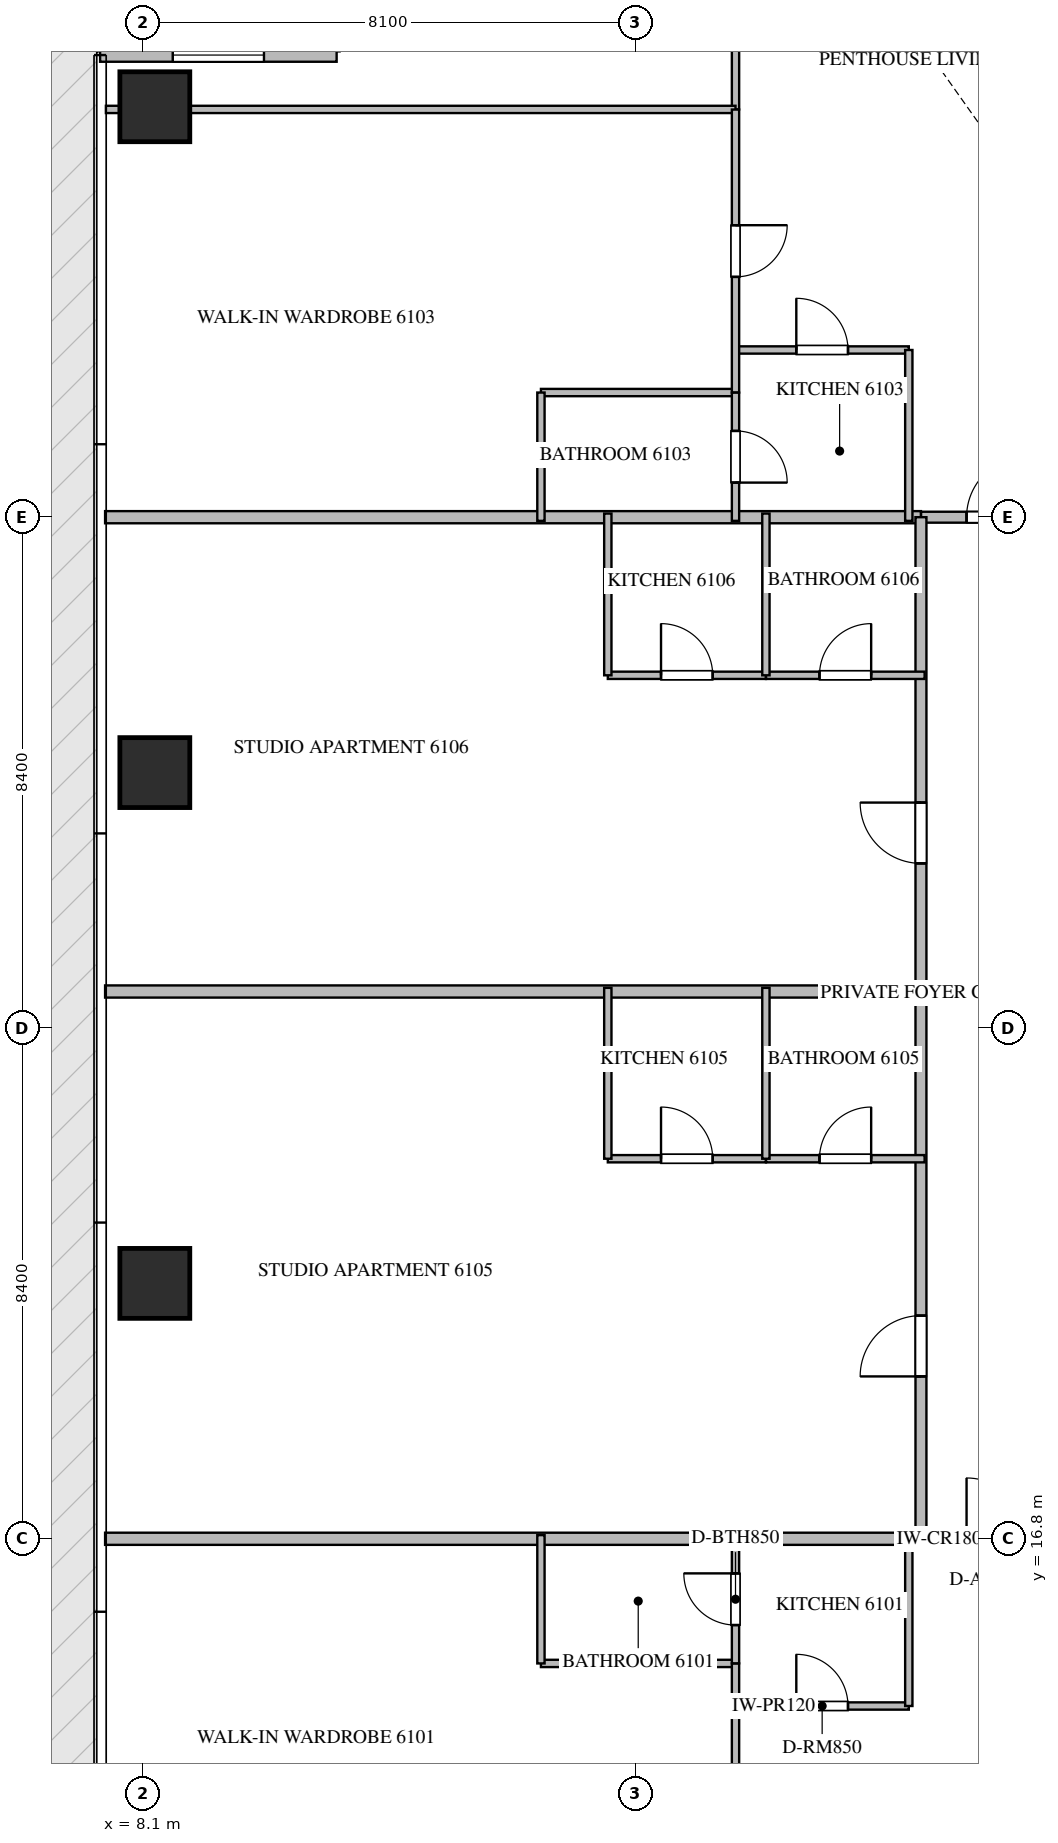
"""IFC4 building model, lengths in metres.
Left out: names, types, materials, properties, quantities, classifications, styles, units other than length and angle.
Written with IfcOpenShell. Run it as: python <this file> out.ifc"""

import sys

from ifc_helpers import new_model, si_unit, direction, frame, frame_2d, origin, origin_2d, place, context, subcontext, project, spatial, rectangle, extrude, source, transform, mapped, element, fill, save


model = new_model("IFC4")
c1 = context("Model", 3, precision=1e-05, world=origin(), true_north=direction((0.0, 1.0)))
c2 = subcontext(c1, "Body", "Model", "MODEL_VIEW")
j1 = project(units=[si_unit("LENGTHUNIT", "METRE"), si_unit("PLANEANGLEUNIT", "RADIAN")], contexts=[c1])
p1 = place(None, origin())
s1 = spatial("IfcSite", under=j1, at=p1, CompositionType="ELEMENT")
p2 = place(p1, origin())
s2 = spatial("IfcBuilding", under=s1, at=p2, CompositionType="ELEMENT")
p3 = place(p2, frame((0.0, 0.0, 245.1)))
s3 = spatial("IfcBuildingStorey", under=s2, at=p3, CompositionType="ELEMENT", Elevation=245.1)
m1 = source(origin(), c2, "Body", "SweptSolid", [
    extrude(rectangle(XDim=1.15, YDim=1.15, at=origin_2d()), origin(), (0.0, 0.0, 1.0), 3.85),
])
for number, where, z_axis, x_axis in (
    (1, (8.3, 21.0, -0.26), (0.0, 0.0, 1.0), (1.0, 0.0, 0.0)),
    (2, (8.3, 29.4, -0.26), (0.0, 0.0, 1.0), (1.0, 0.0, 0.0)),
    (3, (8.3, 40.35, -0.26), (0.0, 0.0, 1.0), (1.0, 0.0, 0.0)),
):
    element("IfcColumn", number, at=place(p3, frame(where, z_axis=z_axis, x_axis=x_axis)), inside=s3, PredefinedType="COLUMN", context=c2, shape_type="MappedRepresentation", body=[
        mapped(m1, transform((0.0, 0.0, 0.0), scale=1.0)),
    ])
p4 = place(p3, frame((11.29, 41.2, 0.0), z_axis=(0.0, 0.0, 1.0), x_axis=(-1.0, 0.0, 0.0)))
e4 = element("IfcWall", 4, at=p4, inside=s3, PredefinedType="ELEMENTEDWALL", context=c2, shape_type="SweptSolid", body=[
    extrude(rectangle(XDim=3.89, YDim=0.22, at=frame_2d((1.945, 0.0))), origin(), (0.0, 0.0, 1.0), 3.575),
])
p5 = place(p4, frame((1.195, 0.0, 0.65)))
e5 = element("IfcOpeningElement", 5, at=p5, cuts=e4, PredefinedType="OPENING", context=c2, shape_type="SweptSolid", body=[
    extrude(rectangle(XDim=1.5, YDim=2.25, at=frame_2d((0.75, 1.125))), frame((0.0, 0.12, 0.0), z_axis=(0.0, -1.0, 0.0), x_axis=(1.0, 0.0, 0.0)), (0.0, 0.0, 1.0), 0.24),
])
p6 = place(p3, frame((7.482, 25.8, 0.0), z_axis=(0.0, 0.0, 1.0), x_axis=(1.0, 0.0, 0.0)))
e6 = element("IfcWall", 6, at=p6, inside=s3, PredefinedType="PARTITIONING", context=c2, shape_type="SweptSolid", body=[
    extrude(rectangle(XDim=13.538, YDim=0.2, at=frame_2d((6.769, 0.0))), origin(), (0.0, 0.0, 1.0), 3.59),
])
for number, where, z_axis, x_axis in (
    (7, (7.482, 16.8, 0.0), (0.0, 0.0, 1.0), (1.0, 0.0, 0.0)),
    (8, (7.482, 33.6, 0.0), (0.0, 0.0, 1.0), (1.0, 0.0, 0.0)),
):
    element("IfcWall", number, at=place(p3, frame(where, z_axis=z_axis, x_axis=x_axis)), inside=s3, PredefinedType="PARTITIONING", context=c2, shape_type="SweptSolid", body=[
        extrude(rectangle(XDim=13.418, YDim=0.2, at=frame_2d((6.709, 0.0))), origin(), (0.0, 0.0, 1.0), 3.59),
    ])
p7 = place(p3, frame((20.902, 16.8, 0.0), z_axis=(0.0, 0.0, 1.0), x_axis=(1.0, 0.0, 0.0)))
e9 = element("IfcWall", 9, at=p7, inside=s3, PredefinedType="PARTITIONING", context=c2, shape_type="SweptSolid", body=[
    extrude(rectangle(XDim=2.496, YDim=0.18, at=frame_2d((1.248, 0.0))), origin(), (0.0, 0.0, 1.0), 3.59),
])
p8 = place(p7, frame((0.748, 0.0, 0.0)))
e10 = element("IfcOpeningElement", 10, at=p8, cuts=e9, PredefinedType="OPENING", context=c2, shape_type="SweptSolid", body=[
    extrude(rectangle(XDim=1.0, YDim=2.15, at=frame_2d((0.5, 1.075))), frame((0.0, 0.1, 0.0), z_axis=(0.0, -1.0, 0.0), x_axis=(1.0, 0.0, 0.0)), (0.0, 0.0, 1.0), 0.2),
])
p9 = place(p3, frame((20.902, 33.6, 0.0), z_axis=(0.0, 0.0, 1.0), x_axis=(1.0, 0.0, 0.0)))
e11 = element("IfcWall", 11, at=p9, inside=s3, PredefinedType="PARTITIONING", context=c2, shape_type="SweptSolid", body=[
    extrude(rectangle(XDim=2.496, YDim=0.18, at=frame_2d((1.248, 0.0))), origin(), (0.0, 0.0, 1.0), 3.59),
])
p10 = place(p9, frame((0.748, 0.0, 0.0)))
e12 = element("IfcOpeningElement", 12, at=p10, cuts=e11, PredefinedType="OPENING", context=c2, shape_type="SweptSolid", body=[
    extrude(rectangle(XDim=1.0, YDim=2.15, at=frame_2d((0.5, 1.075))), frame((0.0, 0.1, 0.0), z_axis=(0.0, -1.0, 0.0), x_axis=(1.0, 0.0, 0.0)), (0.0, 0.0, 1.0), 0.2),
])
p11 = place(p3, frame((20.9, 16.8, 0.0), z_axis=(0.0, 0.0, 1.0), x_axis=(0.0, 1.0, 0.0)))
e13 = element("IfcWall", 13, at=p11, inside=s3, PredefinedType="PARTITIONING", context=c2, shape_type="SweptSolid", body=[
    extrude(rectangle(XDim=16.8, YDim=0.18, at=frame_2d((8.4, 0.0))), origin(), (0.0, 0.0, 1.0), 3.59),
])
p12 = place(p11, frame((2.67, 0.0, 0.0)))
e14 = element("IfcOpeningElement", 14, at=p12, cuts=e13, PredefinedType="OPENING", context=c2, shape_type="SweptSolid", body=[
    extrude(rectangle(XDim=1.0, YDim=2.15, at=frame_2d((0.5, 1.075))), frame((0.0, 0.1, 0.0), z_axis=(0.0, -1.0, 0.0), x_axis=(1.0, 0.0, 0.0)), (0.0, 0.0, 1.0), 0.2),
])
p13 = place(p11, frame((11.107, 0.0, 0.0)))
e15 = element("IfcOpeningElement", 15, at=p13, cuts=e13, PredefinedType="OPENING", context=c2, shape_type="SweptSolid", body=[
    extrude(rectangle(XDim=1.0, YDim=2.15, at=frame_2d((0.5, 1.075))), frame((0.0, 0.1, 0.0), z_axis=(0.0, -1.0, 0.0), x_axis=(1.0, 0.0, 0.0)), (0.0, 0.0, 1.0), 0.2),
])
p14 = place(p3, frame((17.85, 14.05, 0.0), z_axis=(0.0, 0.0, 1.0), x_axis=(1.0, 0.0, 0.0)))
e16 = element("IfcWall", 16, at=p14, inside=s3, PredefinedType="PARTITIONING", context=c2, shape_type="SweptSolid", body=[
    extrude(rectangle(XDim=2.85, YDim=0.12, at=frame_2d((1.425, 0.0))), origin(), (0.0, 0.0, 1.0), 3.59),
])
p15 = place(p14, frame((1.0, 0.0, 0.0)))
e17 = element("IfcOpeningElement", 17, at=p15, cuts=e16, PredefinedType="OPENING", context=c2, shape_type="SweptSolid", body=[
    extrude(rectangle(XDim=0.85, YDim=2.1, at=frame_2d((0.425, 1.05))), frame((0.0, 0.07, 0.0), z_axis=(0.0, -1.0, 0.0), x_axis=(1.0, 0.0, 0.0)), (0.0, 0.0, 1.0), 0.14),
])
p16 = place(p3, frame((20.7, 14.05, 0.0), z_axis=(0.0, 0.0, 1.0), x_axis=(0.0, 1.0, 0.0)))
e18 = element("IfcWall", 18, at=p16, inside=s3, PredefinedType="PARTITIONING", context=c2, shape_type="SweptSolid", body=[
    extrude(rectangle(XDim=2.81, YDim=0.12, at=frame_2d((1.405, 0.0))), origin(), (0.0, 0.0, 1.0), 3.59),
])
p17 = place(p3, frame((14.65, 14.75, 0.0), z_axis=(0.0, 0.0, 1.0), x_axis=(1.0, 0.0, 0.0)))
e19 = element("IfcWall", 19, at=p17, inside=s3, PredefinedType="PARTITIONING", context=c2, shape_type="SweptSolid", body=[
    extrude(rectangle(XDim=3.2, YDim=0.12, at=frame_2d((1.6, 0.0))), origin(), (0.0, 0.0, 1.0), 3.59),
])
p18 = place(p3, frame((14.65, 14.75, 0.0), z_axis=(0.0, 0.0, 1.0), x_axis=(0.0, 1.0, 0.0)))
e20 = element("IfcWall", 20, at=p18, inside=s3, PredefinedType="PARTITIONING", context=c2, shape_type="SweptSolid", body=[
    extrude(rectangle(XDim=2.11, YDim=0.12, at=frame_2d((1.055, 0.0))), origin(), (0.0, 0.0, 1.0), 3.59),
])
p19 = place(p3, frame((17.85, 10.096, 0.0), z_axis=(0.0, 0.0, 1.0), x_axis=(0.0, 1.0, 0.0)))
e21 = element("IfcWall", 21, at=p19, inside=s3, PredefinedType="PARTITIONING", context=c2, shape_type="SweptSolid", body=[
    extrude(rectangle(XDim=4.654, YDim=0.12, at=frame_2d((2.327, 0.0))), origin(), (0.0, 0.0, 1.0), 3.59),
])
p20 = place(p19, frame((1.902, 0.0, 0.0)))
e22 = element("IfcOpeningElement", 22, at=p20, cuts=e21, PredefinedType="OPENING", context=c2, shape_type="SweptSolid", body=[
    extrude(rectangle(XDim=0.85, YDim=2.1, at=frame_2d((0.425, 1.05))), frame((0.0, 0.07, 0.0), z_axis=(0.0, -1.0, 0.0), x_axis=(1.0, 0.0, 0.0)), (0.0, 0.0, 1.0), 0.14),
])
p21 = place(p3, frame((17.85, 14.752, 0.0), z_axis=(0.0, 0.0, 1.0), x_axis=(0.0, 1.0, 0.0)))
e23 = element("IfcWall", 23, at=p21, inside=s3, PredefinedType="PARTITIONING", context=c2, shape_type="SweptSolid", body=[
    extrude(rectangle(XDim=2.108, YDim=0.12, at=frame_2d((1.054, 0.0))), origin(), (0.0, 0.0, 1.0), 3.59),
])
p22 = place(p21, frame((0.629, 0.0, 0.0)))
e24 = element("IfcOpeningElement", 24, at=p22, cuts=e23, PredefinedType="OPENING", context=c2, shape_type="SweptSolid", body=[
    extrude(rectangle(XDim=0.85, YDim=2.1, at=frame_2d((0.425, 1.05))), frame((0.0, 0.07, 0.0), z_axis=(0.0, -1.0, 0.0), x_axis=(1.0, 0.0, 0.0)), (0.0, 0.0, 1.0), 0.14),
])
p23 = place(p3, frame((17.85, 36.35, 0.0), z_axis=(0.0, 0.0, 1.0), x_axis=(1.0, 0.0, 0.0)))
e25 = element("IfcWall", 25, at=p23, inside=s3, PredefinedType="PARTITIONING", context=c2, shape_type="SweptSolid", body=[
    extrude(rectangle(XDim=2.85, YDim=0.12, at=frame_2d((1.425, 0.0))), origin(), (0.0, 0.0, 1.0), 3.59),
])
p24 = place(p23, frame((1.0, 0.0, 0.0)))
e26 = element("IfcOpeningElement", 26, at=p24, cuts=e25, PredefinedType="OPENING", context=c2, shape_type="SweptSolid", body=[
    extrude(rectangle(XDim=0.85, YDim=2.1, at=frame_2d((0.425, 1.05))), frame((0.0, 0.07, 0.0), z_axis=(0.0, -1.0, 0.0), x_axis=(1.0, 0.0, 0.0)), (0.0, 0.0, 1.0), 0.14),
])
p25 = place(p3, frame((20.7, 36.35, 0.0), z_axis=(0.0, 0.0, 1.0), x_axis=(0.0, -1.0, 0.0)))
e27 = element("IfcWall", 27, at=p25, inside=s3, PredefinedType="PARTITIONING", context=c2, shape_type="SweptSolid", body=[
    extrude(rectangle(XDim=2.81, YDim=0.12, at=frame_2d((1.405, 0.0))), origin(), (0.0, 0.0, 1.0), 3.59),
])
p26 = place(p3, frame((17.85, 49.105, 0.0), z_axis=(0.0, 0.0, 1.0), x_axis=(0.0, -1.0, 0.0)))
e28 = element("IfcWall", 28, at=p26, inside=s3, PredefinedType="PARTITIONING", context=c2, shape_type="SweptSolid", body=[
    extrude(rectangle(XDim=8.799, YDim=0.12, at=frame_2d((4.399, 0.0))), origin(), (0.0, 0.0, 1.0), 3.59),
])
p27 = place(p26, frame((4.344, 0.0, 0.0)))
e29 = element("IfcOpeningElement", 29, at=p27, cuts=e28, PredefinedType="OPENING", context=c2, shape_type="SweptSolid", body=[
    extrude(rectangle(XDim=0.9, YDim=2.1, at=frame_2d((0.45, 1.05))), frame((0.0, 0.07, 0.0), z_axis=(0.0, -1.0, 0.0), x_axis=(1.0, 0.0, 0.0)), (0.0, 0.0, 1.0), 0.14),
])
p28 = place(p3, frame((7.495, 40.306, 0.0), z_axis=(0.0, 0.0, 1.0), x_axis=(1.0, 0.0, 0.0)))
e30 = element("IfcWall", 30, at=p28, inside=s3, PredefinedType="PARTITIONING", context=c2, shape_type="SweptSolid", body=[
    extrude(rectangle(XDim=10.355, YDim=0.12, at=frame_2d((5.177, 0.0))), origin(), (0.0, 0.0, 1.0), 3.122),
])
p29 = place(p3, frame((14.65, 35.65, 0.0), z_axis=(0.0, 0.0, 1.0), x_axis=(1.0, 0.0, 0.0)))
e31 = element("IfcWall", 31, at=p29, inside=s3, PredefinedType="PARTITIONING", context=c2, shape_type="SweptSolid", body=[
    extrude(rectangle(XDim=3.2, YDim=0.12, at=frame_2d((1.6, 0.0))), origin(), (0.0, 0.0, 1.0), 3.59),
])
p30 = place(p3, frame((14.65, 35.65, 0.0), z_axis=(0.0, 0.0, 1.0), x_axis=(0.0, -1.0, 0.0)))
e32 = element("IfcWall", 32, at=p30, inside=s3, PredefinedType="PARTITIONING", context=c2, shape_type="SweptSolid", body=[
    extrude(rectangle(XDim=2.11, YDim=0.12, at=frame_2d((1.055, 0.0))), origin(), (0.0, 0.0, 1.0), 3.59),
])
p31 = place(p3, frame((17.85, 40.304, 0.0), z_axis=(0.0, 0.0, 1.0), x_axis=(0.0, -1.0, 0.0)))
e33 = element("IfcWall", 33, at=p31, inside=s3, PredefinedType="PARTITIONING", context=c2, shape_type="SweptSolid", body=[
    extrude(rectangle(XDim=4.654, YDim=0.12, at=frame_2d((2.327, 0.0))), origin(), (0.0, 0.0, 1.0), 3.59),
])
p32 = place(p31, frame((1.902, 0.0, 0.0)))
e34 = element("IfcOpeningElement", 34, at=p32, cuts=e33, PredefinedType="OPENING", context=c2, shape_type="SweptSolid", body=[
    extrude(rectangle(XDim=0.85, YDim=2.1, at=frame_2d((0.425, 1.05))), frame((0.0, 0.07, 0.0), z_axis=(0.0, -1.0, 0.0), x_axis=(1.0, 0.0, 0.0)), (0.0, 0.0, 1.0), 0.14),
])
p33 = place(p3, frame((17.85, 35.648, 0.0), z_axis=(0.0, 0.0, 1.0), x_axis=(0.0, -1.0, 0.0)))
e35 = element("IfcWall", 35, at=p33, inside=s3, PredefinedType="PARTITIONING", context=c2, shape_type="SweptSolid", body=[
    extrude(rectangle(XDim=2.108, YDim=0.12, at=frame_2d((1.054, 0.0))), origin(), (0.0, 0.0, 1.0), 3.59),
])
p34 = place(p33, frame((0.629, 0.0, 0.0)))
e36 = element("IfcOpeningElement", 36, at=p34, cuts=e35, PredefinedType="OPENING", context=c2, shape_type="SweptSolid", body=[
    extrude(rectangle(XDim=0.85, YDim=2.1, at=frame_2d((0.425, 1.05))), frame((0.0, 0.07, 0.0), z_axis=(0.0, -1.0, 0.0), x_axis=(1.0, 0.0, 0.0)), (0.0, 0.0, 1.0), 0.14),
])
p35 = place(p3, frame((15.75, 23.05, 0.0), z_axis=(0.0, 0.0, 1.0), x_axis=(1.0, 0.0, 0.0)))
e37 = element("IfcWall", 37, at=p35, inside=s3, PredefinedType="PARTITIONING", context=c2, shape_type="SweptSolid", body=[
    extrude(rectangle(XDim=2.6, YDim=0.12, at=frame_2d((1.3, 0.0))), origin(), (0.0, 0.0, 1.0), 3.59),
])
p36 = place(p35, frame((0.875, 0.0, 0.0)))
e38 = element("IfcOpeningElement", 38, at=p36, cuts=e37, PredefinedType="OPENING", context=c2, shape_type="SweptSolid", body=[
    extrude(rectangle(XDim=0.85, YDim=2.1, at=frame_2d((0.425, 1.05))), frame((0.0, 0.07, 0.0), z_axis=(0.0, -1.0, 0.0), x_axis=(1.0, 0.0, 0.0)), (0.0, 0.0, 1.0), 0.14),
])
p37 = place(p3, frame((18.352, 23.05, 0.0), z_axis=(0.0, 0.0, 1.0), x_axis=(1.0, 0.0, 0.0)))
e39 = element("IfcWall", 39, at=p37, inside=s3, PredefinedType="PARTITIONING", context=c2, shape_type="SweptSolid", body=[
    extrude(rectangle(XDim=2.608, YDim=0.12, at=frame_2d((1.304, 0.0))), origin(), (0.0, 0.0, 1.0), 3.59),
])
p38 = place(p37, frame((0.879, 0.0, 0.0)))
e40 = element("IfcOpeningElement", 40, at=p38, cuts=e39, PredefinedType="OPENING", context=c2, shape_type="SweptSolid", body=[
    extrude(rectangle(XDim=0.85, YDim=2.1, at=frame_2d((0.425, 1.05))), frame((0.0, 0.07, 0.0), z_axis=(0.0, -1.0, 0.0), x_axis=(1.0, 0.0, 0.0)), (0.0, 0.0, 1.0), 0.14),
])
for number, where, z_axis, x_axis in (
    (41, (18.35, 23.05, 0.0), (0.0, 0.0, 1.0), (0.0, 1.0, 0.0)),
    (42, (15.75, 23.05, 0.0), (0.0, 0.0, 1.0), (0.0, 1.0, 0.0)),
):
    element("IfcWall", number, at=place(p3, frame(where, z_axis=z_axis, x_axis=x_axis)), inside=s3, PredefinedType="PARTITIONING", context=c2, shape_type="SweptSolid", body=[
        extrude(rectangle(XDim=2.81, YDim=0.12, at=frame_2d((1.405, 0.0))), origin(), (0.0, 0.0, 1.0), 3.59),
    ])
p39 = place(p3, frame((15.75, 31.0, 0.0), z_axis=(0.0, 0.0, 1.0), x_axis=(1.0, 0.0, 0.0)))
e43 = element("IfcWall", 43, at=p39, inside=s3, PredefinedType="PARTITIONING", context=c2, shape_type="SweptSolid", body=[
    extrude(rectangle(XDim=2.6, YDim=0.12, at=frame_2d((1.3, 0.0))), origin(), (0.0, 0.0, 1.0), 3.59),
])
p40 = place(p39, frame((0.875, 0.0, 0.0)))
e44 = element("IfcOpeningElement", 44, at=p40, cuts=e43, PredefinedType="OPENING", context=c2, shape_type="SweptSolid", body=[
    extrude(rectangle(XDim=0.85, YDim=2.1, at=frame_2d((0.425, 1.05))), frame((0.0, 0.07, 0.0), z_axis=(0.0, -1.0, 0.0), x_axis=(1.0, 0.0, 0.0)), (0.0, 0.0, 1.0), 0.14),
])
p41 = place(p3, frame((18.352, 31.0, 0.0), z_axis=(0.0, 0.0, 1.0), x_axis=(1.0, 0.0, 0.0)))
e45 = element("IfcWall", 45, at=p41, inside=s3, PredefinedType="PARTITIONING", context=c2, shape_type="SweptSolid", body=[
    extrude(rectangle(XDim=2.608, YDim=0.12, at=frame_2d((1.304, 0.0))), origin(), (0.0, 0.0, 1.0), 3.59),
])
p42 = place(p41, frame((0.879, 0.0, 0.0)))
e46 = element("IfcOpeningElement", 46, at=p42, cuts=e45, PredefinedType="OPENING", context=c2, shape_type="SweptSolid", body=[
    extrude(rectangle(XDim=0.85, YDim=2.1, at=frame_2d((0.425, 1.05))), frame((0.0, 0.07, 0.0), z_axis=(0.0, -1.0, 0.0), x_axis=(1.0, 0.0, 0.0)), (0.0, 0.0, 1.0), 0.14),
])
for number, where, z_axis, x_axis in (
    (47, (18.35, 31.0, 0.0), (0.0, 0.0, 1.0), (0.0, 1.0, 0.0)),
    (48, (15.75, 31.0, 0.0), (0.0, 0.0, 1.0), (0.0, 1.0, 0.0)),
):
    element("IfcWall", number, at=place(p3, frame(where, z_axis=z_axis, x_axis=x_axis)), inside=s3, PredefinedType="PARTITIONING", context=c2, shape_type="SweptSolid", body=[
        extrude(rectangle(XDim=2.66, YDim=0.12, at=frame_2d((1.33, 0.0))), origin(), (0.0, 0.0, 1.0), 3.59),
    ])
m2 = source(origin(), c2, "Body", "SweptSolid", [
    extrude(rectangle(XDim=1.5, YDim=2.25, at=frame_2d((0.75, 1.125))), frame((0.0, 0.03, 0.0), z_axis=(0.0, -1.0, 0.0), x_axis=(1.0, 0.0, 0.0)), (0.0, 0.0, 1.0), 0.06),
])
p43 = place(p5, origin())
e49 = element("IfcWindow", 49, at=p43, inside=s3, PartitioningType="SINGLE_PANEL", PredefinedType="WINDOW", context=c2, shape_type="MappedRepresentation", body=[
    mapped(m2, transform((0.0, 0.0, 0.0), scale=1.0)),
])
fill(e5, e49)
m3 = source(origin(), c2, "Body", "SweptSolid", [
    extrude(rectangle(XDim=1.0, YDim=2.15, at=frame_2d((0.5, 1.075))), frame((0.0, 0.025, 0.0), z_axis=(0.0, -1.0, 0.0), x_axis=(1.0, 0.0, 0.0)), (0.0, 0.0, 1.0), 0.05),
])
p44 = place(p8, origin())
e50 = element("IfcDoor", 50, at=p44, inside=s3, OperationType="SINGLE_SWING_LEFT", PredefinedType="DOOR", context=c2, shape_type="MappedRepresentation", body=[
    mapped(m3, transform((0.0, 0.0, 0.0), scale=1.0)),
])
fill(e10, e50)
p45 = place(p10, origin())
e51 = element("IfcDoor", 51, at=p45, inside=s3, OperationType="SINGLE_SWING_RIGHT", PredefinedType="DOOR", context=c2, shape_type="MappedRepresentation", body=[
    mapped(m3, transform((0.0, 0.0, 0.0), scale=1.0)),
])
fill(e12, e51)
p46 = place(p12, origin())
e52 = element("IfcDoor", 52, at=p46, inside=s3, OperationType="SINGLE_SWING_LEFT", PredefinedType="DOOR", context=c2, shape_type="MappedRepresentation", body=[
    mapped(m3, transform((0.0, 0.0, 0.0), scale=1.0)),
])
fill(e14, e52)
p47 = place(p13, origin())
e53 = element("IfcDoor", 53, at=p47, inside=s3, OperationType="SINGLE_SWING_RIGHT", PredefinedType="DOOR", context=c2, shape_type="MappedRepresentation", body=[
    mapped(m3, transform((0.0, 0.0, 0.0), scale=1.0)),
])
fill(e15, e53)
m4 = source(origin(), c2, "Body", "SweptSolid", [
    extrude(rectangle(XDim=0.85, YDim=2.1, at=frame_2d((0.425, 1.05))), frame((0.0, 0.025, 0.0), z_axis=(0.0, -1.0, 0.0), x_axis=(1.0, 0.0, 0.0)), (0.0, 0.0, 1.0), 0.05),
])
p48 = place(p15, origin())
e54 = element("IfcDoor", 54, at=p48, inside=s3, OperationType="SINGLE_SWING_LEFT", PredefinedType="DOOR", context=c2, shape_type="MappedRepresentation", body=[
    mapped(m4, transform((0.0, 0.0, 0.0), scale=1.0)),
])
fill(e17, e54)
p49 = place(p22, origin())
e55 = element("IfcDoor", 55, at=p49, inside=s3, OperationType="SINGLE_SWING_RIGHT", PredefinedType="DOOR", context=c2, shape_type="MappedRepresentation", body=[
    mapped(m4, transform((0.0, 0.0, 0.0), scale=1.0)),
])
fill(e24, e55)
p50 = place(p24, origin())
e56 = element("IfcDoor", 56, at=p50, inside=s3, OperationType="SINGLE_SWING_LEFT", PredefinedType="DOOR", context=c2, shape_type="MappedRepresentation", body=[
    mapped(m4, transform((0.0, 0.0, 0.0), scale=1.0)),
])
fill(e26, e56)
p51 = place(p32, origin())
e57 = element("IfcDoor", 57, at=p51, inside=s3, OperationType="SINGLE_SWING_LEFT", PredefinedType="DOOR", context=c2, shape_type="MappedRepresentation", body=[
    mapped(m4, transform((0.0, 0.0, 0.0), scale=1.0)),
])
fill(e34, e57)
p52 = place(p34, origin())
e58 = element("IfcDoor", 58, at=p52, inside=s3, OperationType="SINGLE_SWING_RIGHT", PredefinedType="DOOR", context=c2, shape_type="MappedRepresentation", body=[
    mapped(m4, transform((0.0, 0.0, 0.0), scale=1.0)),
])
fill(e36, e58)
p53 = place(p36, origin())
e59 = element("IfcDoor", 59, at=p53, inside=s3, OperationType="SINGLE_SWING_LEFT", PredefinedType="DOOR", context=c2, shape_type="MappedRepresentation", body=[
    mapped(m4, transform((0.0, 0.0, 0.0), scale=1.0)),
])
fill(e38, e59)
p54 = place(p38, origin())
e60 = element("IfcDoor", 60, at=p54, inside=s3, OperationType="SINGLE_SWING_RIGHT", PredefinedType="DOOR", context=c2, shape_type="MappedRepresentation", body=[
    mapped(m4, transform((0.0, 0.0, 0.0), scale=1.0)),
])
fill(e40, e60)
p55 = place(p40, origin())
e61 = element("IfcDoor", 61, at=p55, inside=s3, OperationType="SINGLE_SWING_LEFT", PredefinedType="DOOR", context=c2, shape_type="MappedRepresentation", body=[
    mapped(m4, transform((0.0, 0.0, 0.0), scale=1.0)),
])
fill(e44, e61)
p56 = place(p42, origin())
e62 = element("IfcDoor", 62, at=p56, inside=s3, OperationType="SINGLE_SWING_RIGHT", PredefinedType="DOOR", context=c2, shape_type="MappedRepresentation", body=[
    mapped(m4, transform((0.0, 0.0, 0.0), scale=1.0)),
])
fill(e46, e62)
save(model, sys.argv[1])
